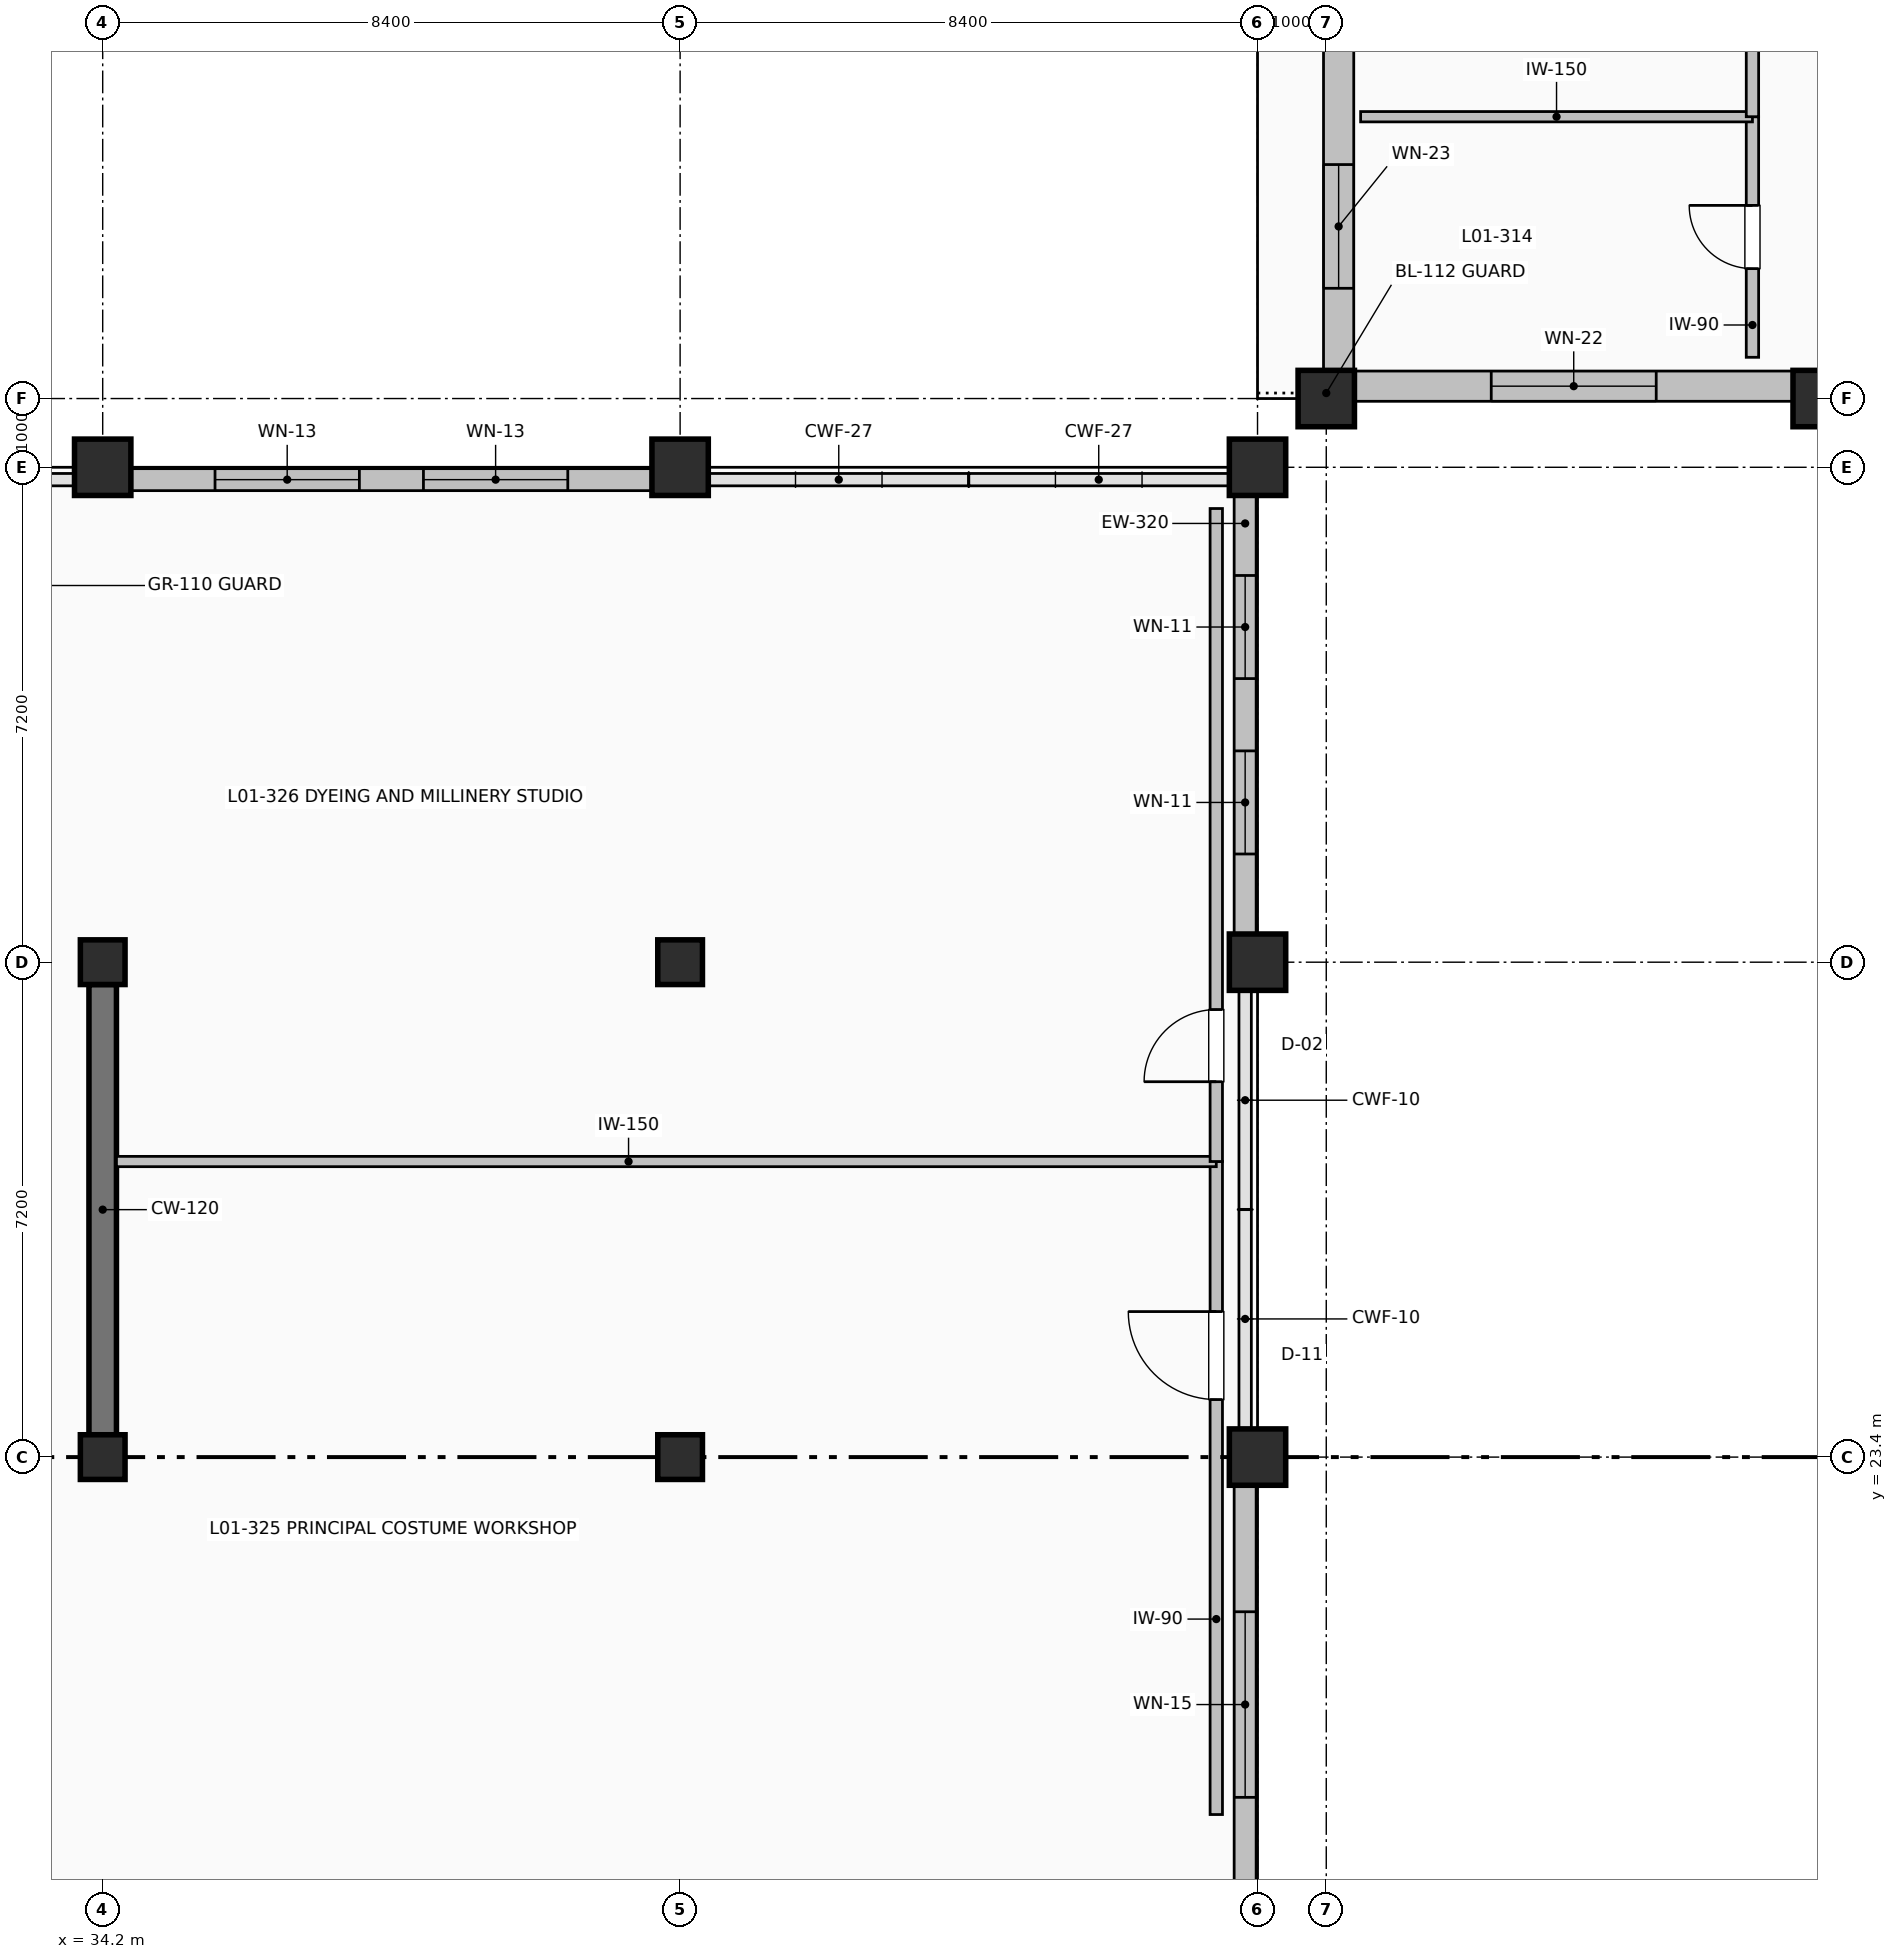
"""IFC4 building model, lengths in metres.
Left out: names, types, materials, properties, quantities, classifications, styles, units other than length and angle.
Written with IfcOpenShell. Run it as: python <this file> out.ifc"""

import sys

from ifc_helpers import new_model, si_unit, direction, frame, frame_2d, origin, origin_2d, place, context, subcontext, project, spatial, rectangle, extrude, element, fill, save


model = new_model("IFC4")
c1 = context("Model", 3, precision=1e-05, world=origin(), true_north=direction((0.0, 1.0)))
c2 = subcontext(c1, "Body", "Model", "MODEL_VIEW")
j1 = project(units=[si_unit("LENGTHUNIT", "METRE"), si_unit("PLANEANGLEUNIT", "RADIAN")], contexts=[c1])
p1 = place(None, origin())
s1 = spatial("IfcSite", under=j1, at=p1, CompositionType="ELEMENT")
p2 = place(p1, origin())
s2 = spatial("IfcBuilding", under=s1, at=p2, CompositionType="ELEMENT")
p3 = place(p2, frame((0.0, 0.0, 5.4)))
s3 = spatial("IfcBuildingStorey", under=s2, at=p3, CompositionType="ELEMENT", Elevation=5.4)
for number, where, z_axis, x_axis in (
    (1, (52.0, 38.8, 0.0), (0.0, 0.0, 1.0), (1.0, 0.0, 0.0)),
    (2, (59.2, 38.8, 0.0), (0.0, 0.0, 1.0), (1.0, 0.0, 0.0)),
):
    element("IfcColumn", number, at=place(p3, frame(where, z_axis=z_axis, x_axis=x_axis)), inside=s3, PredefinedType="COLUMN", context=c2, shape_type="SweptSolid", body=[
        extrude(rectangle(XDim=0.82, YDim=0.82, at=origin_2d()), origin(), (0.0, 0.0, 1.0), 4.8),
    ])
for number, where, z_axis, x_axis in (
    (3, (34.2, 23.4, 0.0), (0.0, 0.0, 1.0), (1.0, 0.0, 0.0)),
    (4, (34.2, 30.6, 0.0), (0.0, 0.0, 1.0), (1.0, 0.0, 0.0)),
):
    element("IfcColumn", number, at=place(p3, frame(where, z_axis=z_axis, x_axis=x_axis)), inside=s3, PredefinedType="COLUMN", context=c2, shape_type="SweptSolid", body=[
        extrude(rectangle(XDim=0.65, YDim=0.65, at=origin_2d()), origin(), (0.0, 0.0, 1.0), 4.8),
    ])
p4 = place(p3, frame((34.2, 37.8, 0.0), z_axis=(0.0, 0.0, 1.0), x_axis=(1.0, 0.0, 0.0)))
e5 = element("IfcColumn", 5, at=p4, inside=s3, PredefinedType="COLUMN", context=c2, shape_type="SweptSolid", body=[
    extrude(rectangle(XDim=0.82, YDim=0.82, at=origin_2d()), origin(), (0.0, 0.0, 1.0), 4.8),
])
for number, where, z_axis, x_axis in (
    (6, (42.6, 23.4, 0.0), (0.0, 0.0, 1.0), (1.0, 0.0, 0.0)),
    (7, (42.6, 30.6, 0.0), (0.0, 0.0, 1.0), (1.0, 0.0, 0.0)),
):
    element("IfcColumn", number, at=place(p3, frame(where, z_axis=z_axis, x_axis=x_axis)), inside=s3, PredefinedType="COLUMN", context=c2, shape_type="SweptSolid", body=[
        extrude(rectangle(XDim=0.65, YDim=0.65, at=origin_2d()), origin(), (0.0, 0.0, 1.0), 4.8),
    ])
for number, where, z_axis, x_axis in (
    (8, (42.6, 37.8, 0.0), (0.0, 0.0, 1.0), (1.0, 0.0, 0.0)),
    (9, (51.0, 23.4, 0.0), (0.0, 0.0, 1.0), (1.0, 0.0, 0.0)),
    (10, (51.0, 30.6, 0.0), (0.0, 0.0, 1.0), (1.0, 0.0, 0.0)),
    (11, (51.0, 37.8, 0.0), (0.0, 0.0, 1.0), (1.0, 0.0, 0.0)),
):
    element("IfcColumn", number, at=place(p3, frame(where, z_axis=z_axis, x_axis=x_axis)), inside=s3, PredefinedType="COLUMN", context=c2, shape_type="SweptSolid", body=[
        extrude(rectangle(XDim=0.82, YDim=0.82, at=origin_2d()), origin(), (0.0, 0.0, 1.0), 4.8),
    ])
p5 = place(p3, frame((34.2, 23.725, 0.0), z_axis=(0.0, 0.0, 1.0), x_axis=(0.0, 1.0, 0.0)))
e12 = element("IfcWall", 12, at=p5, inside=s3, PredefinedType="SHEAR", context=c2, shape_type="SweptSolid", body=[
    extrude(rectangle(XDim=6.55, YDim=0.4, at=frame_2d((3.275, 0.0))), origin(), (0.0, 0.0, 1.0), 4.48),
])
p6 = place(p3, frame((52.18, 39.21, 0.0), z_axis=(0.0, 0.0, 1.0), x_axis=(0.0, 1.0, 0.0)))
e13 = element("IfcWall", 13, at=p6, inside=s3, PredefinedType="SOLIDWALL", context=c2, shape_type="SweptSolid", body=[
    extrude(rectangle(XDim=6.98, YDim=0.44, at=frame_2d((3.49, 0.0))), origin(), (0.0, 0.0, 1.0), 3.722),
])
p7 = place(p6, frame((1.194, 0.0, 1.05)))
e14 = element("IfcOpeningElement", 14, at=p7, cuts=e13, PredefinedType="OPENING", context=c2, shape_type="SweptSolid", body=[
    extrude(rectangle(XDim=1.8, YDim=1.25, at=frame_2d((0.9, 0.625))), frame((0.0, 0.23, 0.0), z_axis=(0.0, -1.0, 0.0), x_axis=(1.0, 0.0, 0.0)), (0.0, 0.0, 1.0), 0.46),
])
p8 = place(p3, frame((58.79, 38.98, 0.0), z_axis=(0.0, 0.0, 1.0), x_axis=(-1.0, 0.0, 0.0)))
e15 = element("IfcWall", 15, at=p8, inside=s3, PredefinedType="SOLIDWALL", context=c2, shape_type="SweptSolid", body=[
    extrude(rectangle(XDim=6.38, YDim=0.44, at=frame_2d((3.19, 0.0))), origin(), (0.0, 0.0, 1.0), 3.722),
])
p9 = place(p8, frame((1.99, 0.0, 1.05)))
e16 = element("IfcOpeningElement", 16, at=p9, cuts=e15, PredefinedType="OPENING", context=c2, shape_type="SweptSolid", body=[
    extrude(rectangle(XDim=2.4, YDim=1.25, at=frame_2d((1.2, 0.625))), frame((0.0, 0.23, 0.0), z_axis=(0.0, -1.0, 0.0), x_axis=(1.0, 0.0, 0.0)), (0.0, 0.0, 1.0), 0.46),
])
p10 = place(p3, frame((34.61, 37.62, 0.0), z_axis=(0.0, 0.0, 1.0), x_axis=(1.0, 0.0, 0.0)))
e17 = element("IfcWall", 17, at=p10, inside=s3, PredefinedType="SOLIDWALL", context=c2, shape_type="SweptSolid", body=[
    extrude(rectangle(XDim=7.58, YDim=0.32, at=frame_2d((3.79, 0.0))), origin(), (0.0, 0.0, 1.0), 3.642),
])
p11 = place(p10, frame((1.224, 0.0, 0.95)))
e18 = element("IfcOpeningElement", 18, at=p11, cuts=e17, PredefinedType="OPENING", context=c2, shape_type="SweptSolid", body=[
    extrude(rectangle(XDim=2.1, YDim=1.9, at=frame_2d((1.05, 0.95))), frame((0.0, 0.17, 0.0), z_axis=(0.0, -1.0, 0.0), x_axis=(1.0, 0.0, 0.0)), (0.0, 0.0, 1.0), 0.34),
])
p12 = place(p10, frame((4.256, 0.0, 0.95)))
e19 = element("IfcOpeningElement", 19, at=p12, cuts=e17, PredefinedType="OPENING", context=c2, shape_type="SweptSolid", body=[
    extrude(rectangle(XDim=2.1, YDim=1.9, at=frame_2d((1.05, 0.95))), frame((0.0, 0.17, 0.0), z_axis=(0.0, -1.0, 0.0), x_axis=(1.0, 0.0, 0.0)), (0.0, 0.0, 1.0), 0.34),
])
p13 = place(p3, frame((50.82, 37.39, 0.0), z_axis=(0.0, 0.0, 1.0), x_axis=(0.0, -1.0, 0.0)))
e20 = element("IfcWall", 20, at=p13, inside=s3, PredefinedType="SOLIDWALL", context=c2, shape_type="SweptSolid", body=[
    extrude(rectangle(XDim=6.38, YDim=0.32, at=frame_2d((3.19, 0.0))), origin(), (0.0, 0.0, 1.0), 3.742),
])
p14 = place(p13, frame((1.164, 0.0, 0.95)))
e21 = element("IfcOpeningElement", 21, at=p14, cuts=e20, PredefinedType="OPENING", context=c2, shape_type="SweptSolid", body=[
    extrude(rectangle(XDim=1.5, YDim=1.9, at=frame_2d((0.75, 0.95))), frame((0.0, 0.17, 0.0), z_axis=(0.0, -1.0, 0.0), x_axis=(1.0, 0.0, 0.0)), (0.0, 0.0, 1.0), 0.34),
])
p15 = place(p13, frame((3.716, 0.0, 0.95)))
e22 = element("IfcOpeningElement", 22, at=p15, cuts=e20, PredefinedType="OPENING", context=c2, shape_type="SweptSolid", body=[
    extrude(rectangle(XDim=1.5, YDim=1.9, at=frame_2d((0.75, 0.95))), frame((0.0, 0.17, 0.0), z_axis=(0.0, -1.0, 0.0), x_axis=(1.0, 0.0, 0.0)), (0.0, 0.0, 1.0), 0.34),
])
p16 = place(p3, frame((50.82, 22.99, 0.0), z_axis=(0.0, 0.0, 1.0), x_axis=(0.0, -1.0, 0.0)))
e23 = element("IfcWall", 23, at=p16, inside=s3, PredefinedType="SOLIDWALL", context=c2, shape_type="SweptSolid", body=[
    extrude(rectangle(XDim=6.38, YDim=0.32, at=frame_2d((3.19, 0.0))), origin(), (0.0, 0.0, 1.0), 3.742),
])
p17 = place(p16, frame((1.84, 0.0, 0.95)))
e24 = element("IfcOpeningElement", 24, at=p17, cuts=e23, PredefinedType="OPENING", context=c2, shape_type="SweptSolid", body=[
    extrude(rectangle(XDim=2.7, YDim=1.9, at=frame_2d((1.35, 0.95))), frame((0.0, 0.17, 0.0), z_axis=(0.0, -1.0, 0.0), x_axis=(1.0, 0.0, 0.0)), (0.0, 0.0, 1.0), 0.34),
])
p18 = place(p3, frame((58.2, 39.4, 0.0), z_axis=(0.0, 0.0, 1.0), x_axis=(0.0, 1.0, 0.0)))
e25 = element("IfcWall", 25, at=p18, inside=s3, PredefinedType="PARTITIONING", context=c2, shape_type="SweptSolid", body=[
    extrude(rectangle(XDim=3.5, YDim=0.18, at=frame_2d((1.75, 0.0))), origin(), (0.0, 0.0, 1.0), 4.472),
])
p19 = place(p18, frame((1.29, 0.0, 0.0)))
e26 = element("IfcOpeningElement", 26, at=p19, cuts=e25, PredefinedType="OPENING", context=c2, shape_type="SweptSolid", body=[
    extrude(rectangle(XDim=0.92, YDim=2.05, at=frame_2d((0.46, 1.025))), frame((0.0, 0.1, 0.0), z_axis=(0.0, -1.0, 0.0), x_axis=(1.0, 0.0, 0.0)), (0.0, 0.0, 1.0), 0.2),
])
p20 = place(p3, frame((52.5, 42.9, 0.0), z_axis=(0.0, 0.0, 1.0), x_axis=(1.0, 0.0, 0.0)))
e27 = element("IfcWall", 27, at=p20, inside=s3, PredefinedType="PARTITIONING", context=c2, shape_type="SweptSolid", body=[
    extrude(rectangle(XDim=5.7, YDim=0.15, at=frame_2d((2.85, 0.0))), origin(), (0.0, 0.0, 1.0), 4.472),
])
p21 = place(p3, frame((58.2, 42.9, 0.0), z_axis=(0.0, 0.0, 1.0), x_axis=(0.0, 1.0, 0.0)))
e28 = element("IfcWall", 28, at=p21, inside=s3, PredefinedType="PARTITIONING", context=c2, shape_type="SweptSolid", body=[
    extrude(rectangle(XDim=3.5, YDim=0.18, at=frame_2d((1.75, 0.0))), origin(), (0.0, 0.0, 1.0), 4.472),
])
p22 = place(p21, frame((1.29, 0.0, 0.0)))
e29 = element("IfcOpeningElement", 29, at=p22, cuts=e28, PredefinedType="OPENING", context=c2, shape_type="SweptSolid", body=[
    extrude(rectangle(XDim=0.92, YDim=2.05, at=frame_2d((0.46, 1.025))), frame((0.0, 0.1, 0.0), z_axis=(0.0, -1.0, 0.0), x_axis=(1.0, 0.0, 0.0)), (0.0, 0.0, 1.0), 0.2),
])
p23 = place(p3, frame((50.4, 18.2, 0.0), z_axis=(0.0, 0.0, 1.0), x_axis=(0.0, 1.0, 0.0)))
e30 = element("IfcWall", 30, at=p23, inside=s3, PredefinedType="PARTITIONING", context=c2, shape_type="SweptSolid", body=[
    extrude(rectangle(XDim=9.5, YDim=0.18, at=frame_2d((4.75, 0.0))), origin(), (0.0, 0.0, 1.0), 4.492),
])
p24 = place(p23, frame((6.037, 0.0, 0.0)))
e31 = element("IfcOpeningElement", 31, at=p24, cuts=e30, PredefinedType="OPENING", context=c2, shape_type="SweptSolid", body=[
    extrude(rectangle(XDim=1.28, YDim=2.14, at=frame_2d((0.64, 1.07))), frame((0.0, 0.1, 0.0), z_axis=(0.0, -1.0, 0.0), x_axis=(1.0, 0.0, 0.0)), (0.0, 0.0, 1.0), 0.2),
])
p25 = place(p3, frame((34.4, 27.7, 0.0), z_axis=(0.0, 0.0, 1.0), x_axis=(1.0, 0.0, 0.0)))
e32 = element("IfcWall", 32, at=p25, inside=s3, PredefinedType="PARTITIONING", context=c2, shape_type="SweptSolid", body=[
    extrude(rectangle(XDim=16.0, YDim=0.15, at=frame_2d((8.0, 0.0))), origin(), (0.0, 0.0, 1.0), 4.492),
])
p26 = place(p3, frame((50.4, 27.7, 0.0), z_axis=(0.0, 0.0, 1.0), x_axis=(0.0, 1.0, 0.0)))
e33 = element("IfcWall", 33, at=p26, inside=s3, PredefinedType="PARTITIONING", context=c2, shape_type="SweptSolid", body=[
    extrude(rectangle(XDim=9.5, YDim=0.18, at=frame_2d((4.75, 0.0))), origin(), (0.0, 0.0, 1.0), 4.492),
])
p27 = place(p26, frame((1.161, 0.0, 0.0)))
e34 = element("IfcOpeningElement", 34, at=p27, cuts=e33, PredefinedType="OPENING", context=c2, shape_type="SweptSolid", body=[
    extrude(rectangle(XDim=1.05, YDim=2.1, at=frame_2d((0.525, 1.05))), frame((0.0, 0.1, 0.0), z_axis=(0.0, -1.0, 0.0), x_axis=(1.0, 0.0, 0.0)), (0.0, 0.0, 1.0), 0.2),
])
p28 = place(p7, origin())
e35 = element("IfcWindow", 35, at=p28, inside=s3, PartitioningType="SINGLE_PANEL", PredefinedType="WINDOW", context=c2, shape_type="SweptSolid", body=[
    extrude(rectangle(XDim=1.8, YDim=1.25, at=frame_2d((0.9, 0.625))), frame((0.0, 0.03, 0.0), z_axis=(0.0, -1.0, 0.0), x_axis=(1.0, 0.0, 0.0)), (0.0, 0.0, 1.0), 0.06),
])
fill(e14, e35)
p29 = place(p9, origin())
e36 = element("IfcWindow", 36, at=p29, inside=s3, PartitioningType="SINGLE_PANEL", PredefinedType="WINDOW", context=c2, shape_type="SweptSolid", body=[
    extrude(rectangle(XDim=2.4, YDim=1.25, at=frame_2d((1.2, 0.625))), frame((0.0, 0.03, 0.0), z_axis=(0.0, -1.0, 0.0), x_axis=(1.0, 0.0, 0.0)), (0.0, 0.0, 1.0), 0.06),
])
fill(e16, e36)
p30 = place(p11, origin())
e37 = element("IfcWindow", 37, at=p30, inside=s3, PartitioningType="SINGLE_PANEL", PredefinedType="WINDOW", context=c2, shape_type="SweptSolid", body=[
    extrude(rectangle(XDim=2.1, YDim=1.9, at=frame_2d((1.05, 0.95))), frame((0.0, 0.03, 0.0), z_axis=(0.0, -1.0, 0.0), x_axis=(1.0, 0.0, 0.0)), (0.0, 0.0, 1.0), 0.06),
])
fill(e18, e37)
p31 = place(p12, origin())
e38 = element("IfcWindow", 38, at=p31, inside=s3, PartitioningType="SINGLE_PANEL", PredefinedType="WINDOW", context=c2, shape_type="SweptSolid", body=[
    extrude(rectangle(XDim=2.1, YDim=1.9, at=frame_2d((1.05, 0.95))), frame((0.0, 0.03, 0.0), z_axis=(0.0, -1.0, 0.0), x_axis=(1.0, 0.0, 0.0)), (0.0, 0.0, 1.0), 0.06),
])
fill(e19, e38)
p32 = place(p14, origin())
e39 = element("IfcWindow", 39, at=p32, inside=s3, PartitioningType="SINGLE_PANEL", PredefinedType="WINDOW", context=c2, shape_type="SweptSolid", body=[
    extrude(rectangle(XDim=1.5, YDim=1.9, at=frame_2d((0.75, 0.95))), frame((0.0, 0.03, 0.0), z_axis=(0.0, -1.0, 0.0), x_axis=(1.0, 0.0, 0.0)), (0.0, 0.0, 1.0), 0.06),
])
fill(e21, e39)
p33 = place(p15, origin())
e40 = element("IfcWindow", 40, at=p33, inside=s3, PartitioningType="SINGLE_PANEL", PredefinedType="WINDOW", context=c2, shape_type="SweptSolid", body=[
    extrude(rectangle(XDim=1.5, YDim=1.9, at=frame_2d((0.75, 0.95))), frame((0.0, 0.03, 0.0), z_axis=(0.0, -1.0, 0.0), x_axis=(1.0, 0.0, 0.0)), (0.0, 0.0, 1.0), 0.06),
])
fill(e22, e40)
p34 = place(p17, origin())
e41 = element("IfcWindow", 41, at=p34, inside=s3, PartitioningType="SINGLE_PANEL", PredefinedType="WINDOW", context=c2, shape_type="SweptSolid", body=[
    extrude(rectangle(XDim=2.7, YDim=1.9, at=frame_2d((1.35, 0.95))), frame((0.0, 0.03, 0.0), z_axis=(0.0, -1.0, 0.0), x_axis=(1.0, 0.0, 0.0)), (0.0, 0.0, 1.0), 0.06),
])
fill(e24, e41)
p35 = place(p19, origin())
e42 = element("IfcDoor", 42, at=p35, inside=s3, OperationType="SINGLE_SWING_RIGHT", PredefinedType="DOOR", context=c2, shape_type="SweptSolid", body=[
    extrude(rectangle(XDim=0.92, YDim=2.05, at=frame_2d((0.46, 1.025))), frame((0.0, 0.025, 0.0), z_axis=(0.0, -1.0, 0.0), x_axis=(1.0, 0.0, 0.0)), (0.0, 0.0, 1.0), 0.05),
])
fill(e26, e42)
p36 = place(p24, origin())
e43 = element("IfcDoor", 43, at=p36, inside=s3, OperationType="SINGLE_SWING_RIGHT", PredefinedType="DOOR", context=c2, shape_type="SweptSolid", body=[
    extrude(rectangle(XDim=1.28, YDim=2.14, at=frame_2d((0.64, 1.07))), frame((0.0, 0.025, 0.0), z_axis=(0.0, -1.0, 0.0), x_axis=(1.0, 0.0, 0.0)), (0.0, 0.0, 1.0), 0.05),
])
fill(e31, e43)
p37 = place(p27, origin())
e44 = element("IfcDoor", 44, at=p37, inside=s3, OperationType="SINGLE_SWING_LEFT", PredefinedType="DOOR", context=c2, shape_type="SweptSolid", body=[
    extrude(rectangle(XDim=1.05, YDim=2.1, at=frame_2d((0.525, 1.05))), frame((0.0, 0.025, 0.0), z_axis=(0.0, -1.0, 0.0), x_axis=(1.0, 0.0, 0.0)), (0.0, 0.0, 1.0), 0.05),
])
fill(e34, e44)
save(model, sys.argv[1])
